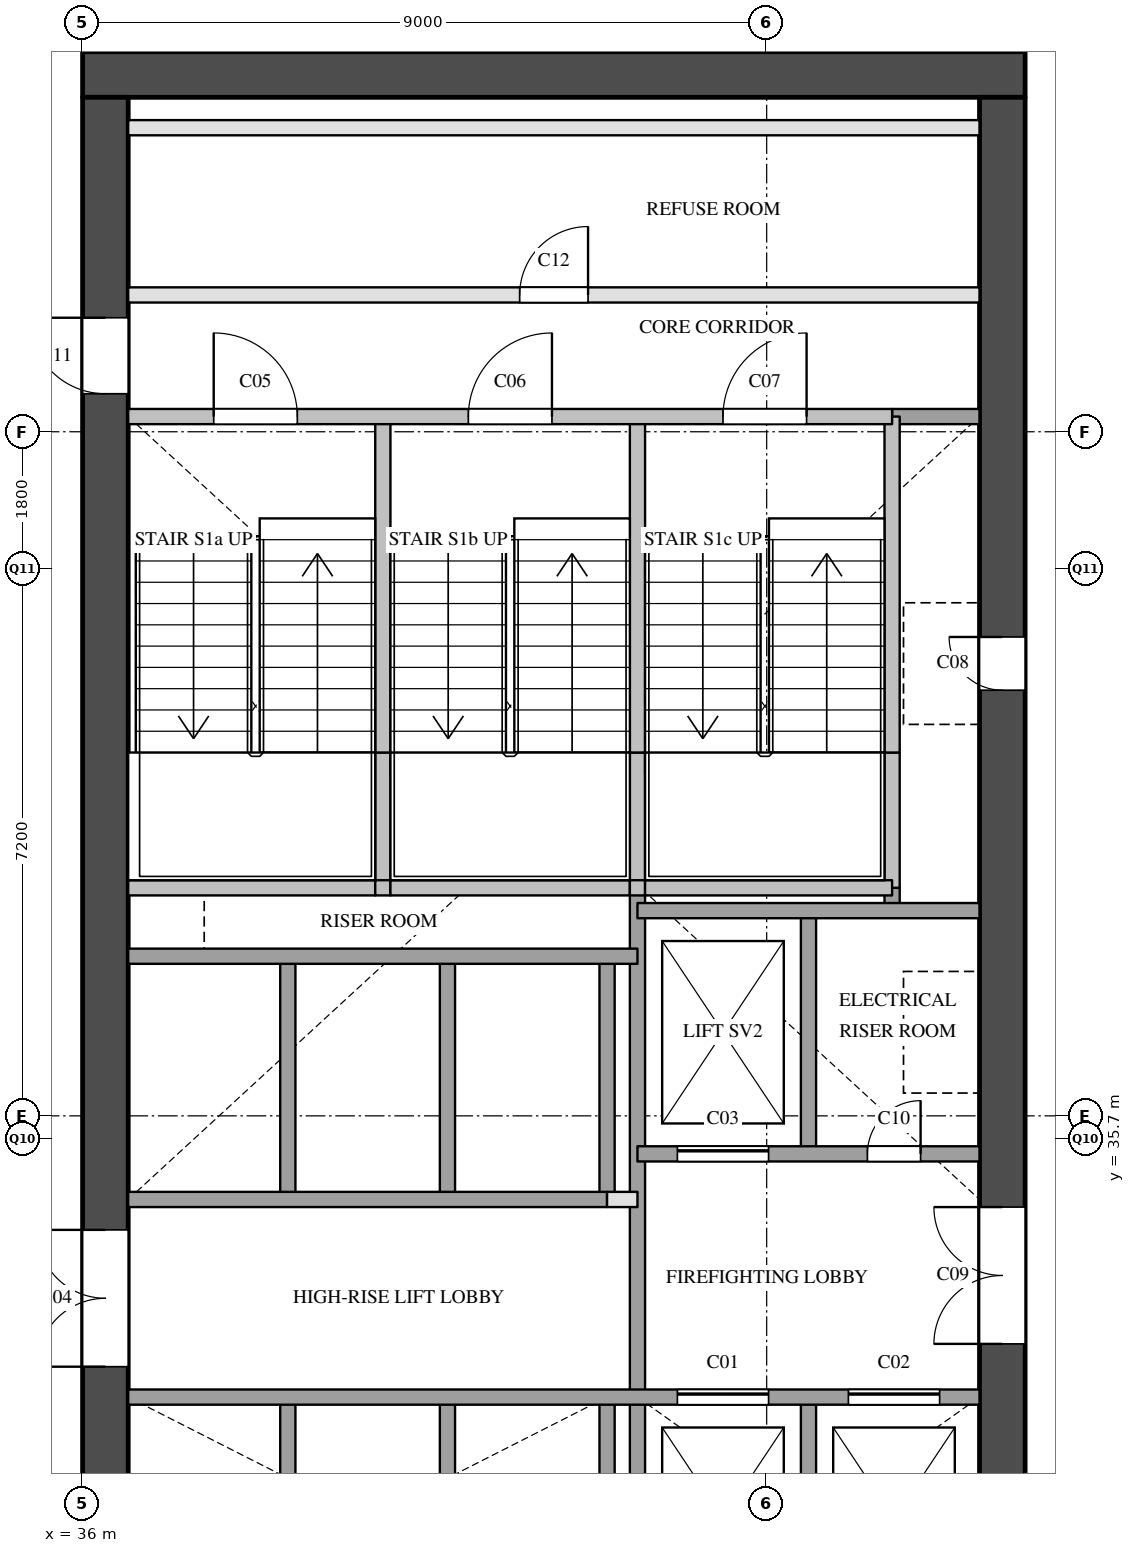
"""IFC4 building model, lengths in metres.
Left out: names, types, materials, properties, quantities, classifications, styles, units other than length and angle.
Written with IfcOpenShell. Run it as: python <this file> out.ifc"""

import sys

from ifc_helpers import new_model, si_unit, direction, frame, frame_2d, origin, place, context, subcontext, project, spatial, rectangle, extrude, element, fill, save


model = new_model("IFC4")
c1 = context("Model", 3, precision=1e-05, world=origin(), true_north=direction((0.0, 1.0)))
c2 = subcontext(c1, "Body", "Model", "MODEL_VIEW")
j1 = project(units=[si_unit("LENGTHUNIT", "METRE"), si_unit("PLANEANGLEUNIT", "RADIAN")], contexts=[c1])
p1 = place(None, origin())
s1 = spatial("IfcSite", under=j1, at=p1, CompositionType="ELEMENT")
p2 = place(p1, origin())
s2 = spatial("IfcBuilding", under=s1, at=p2, CompositionType="ELEMENT")
p3 = place(p2, frame((0.0, 0.0, 96.8)))
s3 = spatial("IfcBuildingStorey", under=s2, at=p3, CompositionType="ELEMENT", Elevation=96.8)
p4 = place(p3, frame((36.0, 49.7, 0.0), z_axis=(0.0, 0.0, 1.0), x_axis=(1.0, 0.0, 0.0)))
e1 = element("IfcWall", 1, at=p4, inside=s3, PredefinedType="SHEAR", context=c2, shape_type="SweptSolid", body=[
    extrude(rectangle(XDim=12.4, YDim=0.6, at=frame_2d((6.2, 0.0))), origin(), (0.0, 0.0, 1.0), 3.5),
])
p5 = place(p3, frame((36.3, 29.1, 0.0), z_axis=(0.0, 0.0, 1.0), x_axis=(0.0, 1.0, 0.0)))
e2 = element("IfcWall", 2, at=p5, inside=s3, PredefinedType="SHEAR", context=c2, shape_type="SweptSolid", body=[
    extrude(rectangle(XDim=20.3, YDim=0.6, at=frame_2d((10.15, 0.0))), origin(), (0.0, 0.0, 1.0), 3.5),
])
p6 = place(p5, frame((3.6, 0.0, 0.0)))
e3 = element("IfcOpeningElement", 3, at=p6, cuts=e2, PredefinedType="OPENING", context=c2, shape_type="SweptSolid", body=[
    extrude(rectangle(XDim=1.8, YDim=2.1, at=frame_2d((0.9, 1.05))), frame((0.0, 0.31, 0.0), z_axis=(0.0, -1.0, 0.0), x_axis=(1.0, 0.0, 0.0)), (0.0, 0.0, 1.0), 0.62),
])
p7 = place(p5, frame((16.4, 0.0, 0.0)))
e4 = element("IfcOpeningElement", 4, at=p7, cuts=e2, PredefinedType="OPENING", context=c2, shape_type="SweptSolid", body=[
    extrude(rectangle(XDim=1.0, YDim=2.1, at=frame_2d((0.5, 1.05))), frame((0.0, 0.31, 0.0), z_axis=(0.0, -1.0, 0.0), x_axis=(1.0, 0.0, 0.0)), (0.0, 0.0, 1.0), 0.62),
])
p8 = place(p3, frame((48.1, 29.1, 0.0), z_axis=(0.0, 0.0, 1.0), x_axis=(0.0, 1.0, 0.0)))
e5 = element("IfcWall", 5, at=p8, inside=s3, PredefinedType="SHEAR", context=c2, shape_type="SweptSolid", body=[
    extrude(rectangle(XDim=20.3, YDim=0.6, at=frame_2d((10.15, 0.0))), origin(), (0.0, 0.0, 1.0), 3.5),
])
p9 = place(p8, frame((12.5, 0.0, 0.0)))
e6 = element("IfcOpeningElement", 6, at=p9, cuts=e5, PredefinedType="OPENING", context=c2, shape_type="SweptSolid", body=[
    extrude(rectangle(XDim=0.7, YDim=2.1, at=frame_2d((0.35, 1.05))), frame((0.0, 0.31, 0.0), z_axis=(0.0, -1.0, 0.0), x_axis=(1.0, 0.0, 0.0)), (0.0, 0.0, 1.0), 0.62),
])
p10 = place(p8, frame((3.9, 0.0, 0.0)))
e7 = element("IfcOpeningElement", 7, at=p10, cuts=e5, PredefinedType="OPENING", context=c2, shape_type="SweptSolid", body=[
    extrude(rectangle(XDim=1.8, YDim=2.1, at=frame_2d((0.9, 1.05))), frame((0.0, 0.31, 0.0), z_axis=(0.0, -1.0, 0.0), x_axis=(1.0, 0.0, 0.0)), (0.0, 0.0, 1.0), 0.62),
])
p11 = place(p3, frame((38.7, 29.1, 0.0), z_axis=(0.0, 0.0, 1.0), x_axis=(0.0, 1.0, 0.0)))
e8 = element("IfcWall", 8, at=p11, inside=s3, PredefinedType="SOLIDWALL", context=c2, shape_type="SweptSolid", body=[
    extrude(rectangle(XDim=3.2, YDim=0.2, at=frame_2d((1.6, 0.0))), origin(), (0.0, 0.0, 1.0), 3.5),
])
p12 = place(p3, frame((38.7, 34.9, 0.0), z_axis=(0.0, 0.0, 1.0), x_axis=(0.0, 1.0, 0.0)))
e9 = element("IfcWall", 9, at=p12, inside=s3, PredefinedType="SOLIDWALL", context=c2, shape_type="SweptSolid", body=[
    extrude(rectangle(XDim=3.2, YDim=0.2, at=frame_2d((1.6, 0.0))), origin(), (0.0, 0.0, 1.0), 3.5),
])
p13 = place(p3, frame((39.95, 39.0, 0.0), z_axis=(0.0, 0.0, 1.0), x_axis=(0.0, 1.0, 0.0)))
e10 = element("IfcWall", 10, at=p13, inside=s3, PredefinedType="SOLIDWALL", context=c2, shape_type="SweptSolid", body=[
    extrude(rectangle(XDim=1.78, YDim=0.2, at=frame_2d((0.89, 0.0))), origin(), (0.0, 0.0, 1.0), 3.5),
])
p14 = place(p3, frame((39.95, 40.78, 0.0), z_axis=(0.0, 0.0, 1.0), x_axis=(0.0, 1.0, 0.0)))
e11 = element("IfcWall", 11, at=p14, inside=s3, PredefinedType="SOLIDWALL", context=c2, shape_type="SweptSolid", body=[
    extrude(rectangle(XDim=4.42, YDim=0.2, at=frame_2d((2.21, 0.0))), origin(), (0.0, 0.0, 1.0), 3.5),
])
p15 = place(p3, frame((40.8, 29.1, 0.0), z_axis=(0.0, 0.0, 1.0), x_axis=(0.0, 1.0, 0.0)))
e12 = element("IfcWall", 12, at=p15, inside=s3, PredefinedType="SOLIDWALL", context=c2, shape_type="SweptSolid", body=[
    extrude(rectangle(XDim=3.2, YDim=0.2, at=frame_2d((1.6, 0.0))), origin(), (0.0, 0.0, 1.0), 3.5),
])
p16 = place(p3, frame((40.8, 34.9, 0.0), z_axis=(0.0, 0.0, 1.0), x_axis=(0.0, 1.0, 0.0)))
e13 = element("IfcWall", 13, at=p16, inside=s3, PredefinedType="SOLIDWALL", context=c2, shape_type="SweptSolid", body=[
    extrude(rectangle(XDim=3.2, YDim=0.2, at=frame_2d((1.6, 0.0))), origin(), (0.0, 0.0, 1.0), 3.5),
])
p17 = place(p3, frame((42.9, 29.1, 0.0), z_axis=(0.0, 0.0, 1.0), x_axis=(0.0, 1.0, 0.0)))
e14 = element("IfcWall", 14, at=p17, inside=s3, PredefinedType="SOLIDWALL", context=c2, shape_type="SweptSolid", body=[
    extrude(rectangle(XDim=3.2, YDim=0.2, at=frame_2d((1.6, 0.0))), origin(), (0.0, 0.0, 1.0), 3.5),
])
p18 = place(p3, frame((42.9, 34.9, 0.0), z_axis=(0.0, 0.0, 1.0), x_axis=(0.0, 1.0, 0.0)))
e15 = element("IfcWall", 15, at=p18, inside=s3, PredefinedType="SOLIDWALL", context=c2, shape_type="SweptSolid", body=[
    extrude(rectangle(XDim=3.2, YDim=0.2, at=frame_2d((1.6, 0.0))), origin(), (0.0, 0.0, 1.0), 3.5),
])
p19 = place(p3, frame((43.3, 29.1, 0.0), z_axis=(0.0, 0.0, 1.0), x_axis=(0.0, 1.0, 0.0)))
e16 = element("IfcWall", 16, at=p19, inside=s3, PredefinedType="SOLIDWALL", context=c2, shape_type="SweptSolid", body=[
    extrude(rectangle(XDim=9.9, YDim=0.2, at=frame_2d((4.95, 0.0))), origin(), (0.0, 0.0, 1.0), 3.5),
])
p20 = place(p3, frame((43.3, 39.0, 0.0), z_axis=(0.0, 0.0, 1.0), x_axis=(0.0, 1.0, 0.0)))
e17 = element("IfcWall", 17, at=p20, inside=s3, PredefinedType="SOLIDWALL", context=c2, shape_type="SweptSolid", body=[
    extrude(rectangle(XDim=1.78, YDim=0.2, at=frame_2d((0.89, 0.0))), origin(), (0.0, 0.0, 1.0), 3.5),
])
p21 = place(p3, frame((43.3, 40.78, 0.0), z_axis=(0.0, 0.0, 1.0), x_axis=(0.0, 1.0, 0.0)))
e18 = element("IfcWall", 18, at=p21, inside=s3, PredefinedType="SOLIDWALL", context=c2, shape_type="SweptSolid", body=[
    extrude(rectangle(XDim=4.42, YDim=0.2, at=frame_2d((2.21, 0.0))), origin(), (0.0, 0.0, 1.0), 3.5),
])
for number, where, z_axis, x_axis in (
    (19, (45.55, 29.1, 0.0), (0.0, 0.0, 1.0), (0.0, 1.0, 0.0)),
    (20, (45.55, 35.5, 0.0), (0.0, 0.0, 1.0), (0.0, 1.0, 0.0)),
):
    element("IfcWall", number, at=place(p3, frame(where, z_axis=z_axis, x_axis=x_axis)), inside=s3, PredefinedType="SOLIDWALL", context=c2, shape_type="SweptSolid", body=[
        extrude(rectangle(XDim=3.2, YDim=0.2, at=frame_2d((1.6, 0.0))), origin(), (0.0, 0.0, 1.0), 3.5),
    ])
p22 = place(p3, frame((46.65, 38.7, 0.0), z_axis=(0.0, 0.0, 1.0), x_axis=(0.0, 1.0, 0.0)))
e21 = element("IfcWall", 21, at=p22, inside=s3, PredefinedType="SOLIDWALL", context=c2, shape_type="SweptSolid", body=[
    extrude(rectangle(XDim=0.3, YDim=0.2, at=frame_2d((0.15, 0.0))), origin(), (0.0, 0.0, 1.0), 3.5),
])
p23 = place(p3, frame((46.65, 39.0, 0.0), z_axis=(0.0, 0.0, 1.0), x_axis=(0.0, 1.0, 0.0)))
e22 = element("IfcWall", 22, at=p23, inside=s3, PredefinedType="SOLIDWALL", context=c2, shape_type="SweptSolid", body=[
    extrude(rectangle(XDim=1.78, YDim=0.2, at=frame_2d((0.89, 0.0))), origin(), (0.0, 0.0, 1.0), 3.5),
])
p24 = place(p3, frame((46.65, 40.78, 0.0), z_axis=(0.0, 0.0, 1.0), x_axis=(0.0, 1.0, 0.0)))
e23 = element("IfcWall", 23, at=p24, inside=s3, PredefinedType="SOLIDWALL", context=c2, shape_type="SweptSolid", body=[
    extrude(rectangle(XDim=4.42, YDim=0.2, at=frame_2d((2.21, 0.0))), origin(), (0.0, 0.0, 1.0), 3.5),
])
p25 = place(p3, frame((36.6, 32.3, 0.0), z_axis=(0.0, 0.0, 1.0), x_axis=(1.0, 0.0, 0.0)))
e24 = element("IfcWall", 24, at=p25, inside=s3, PredefinedType="SOLIDWALL", context=c2, shape_type="SweptSolid", body=[
    extrude(rectangle(XDim=11.2, YDim=0.2, at=frame_2d((5.6, 0.0))), origin(), (0.0, 0.0, 1.0), 3.5),
])
p26 = place(p25, frame((7.225, 0.0, 0.0)))
e25 = element("IfcOpeningElement", 25, at=p26, cuts=e24, PredefinedType="OPENING", context=c2, shape_type="SweptSolid", body=[
    extrude(rectangle(XDim=1.2, YDim=2.1, at=frame_2d((0.6, 1.05))), frame((0.0, 0.11, 0.0), z_axis=(0.0, -1.0, 0.0), x_axis=(1.0, 0.0, 0.0)), (0.0, 0.0, 1.0), 0.22),
])
p27 = place(p25, frame((9.475, 0.0, 0.0)))
e26 = element("IfcOpeningElement", 26, at=p27, cuts=e24, PredefinedType="OPENING", context=c2, shape_type="SweptSolid", body=[
    extrude(rectangle(XDim=1.2, YDim=2.1, at=frame_2d((0.6, 1.05))), frame((0.0, 0.11, 0.0), z_axis=(0.0, -1.0, 0.0), x_axis=(1.0, 0.0, 0.0)), (0.0, 0.0, 1.0), 0.22),
])
p28 = place(p3, frame((42.9, 34.9, 0.0), z_axis=(0.0, 0.0, 1.0), x_axis=(1.0, 0.0, 0.0)))
e27 = element("IfcWall", 27, at=p28, inside=s3, PredefinedType="PARTITIONING", context=c2, shape_type="SweptSolid", body=[
    extrude(rectangle(XDim=0.4, YDim=0.2, at=frame_2d((0.2, 0.0))), origin(), (0.0, 0.0, 1.0), 3.5),
])
p29 = place(p3, frame((36.6, 34.9, 0.0), z_axis=(0.0, 0.0, 1.0), x_axis=(1.0, 0.0, 0.0)))
e28 = element("IfcWall", 28, at=p29, inside=s3, PredefinedType="SOLIDWALL", context=c2, shape_type="SweptSolid", body=[
    extrude(rectangle(XDim=6.3, YDim=0.2, at=frame_2d((3.15, 0.0))), origin(), (0.0, 0.0, 1.0), 3.5),
])
p30 = place(p3, frame((43.3, 35.5, 0.0), z_axis=(0.0, 0.0, 1.0), x_axis=(1.0, 0.0, 0.0)))
e29 = element("IfcWall", 29, at=p30, inside=s3, PredefinedType="SOLIDWALL", context=c2, shape_type="SweptSolid", body=[
    extrude(rectangle(XDim=4.5, YDim=0.2, at=frame_2d((2.25, 0.0))), origin(), (0.0, 0.0, 1.0), 3.5),
])
p31 = place(p30, frame((0.525, 0.0, 0.0)))
e30 = element("IfcOpeningElement", 30, at=p31, cuts=e29, PredefinedType="OPENING", context=c2, shape_type="SweptSolid", body=[
    extrude(rectangle(XDim=1.2, YDim=2.1, at=frame_2d((0.6, 1.05))), frame((0.0, 0.11, 0.0), z_axis=(0.0, -1.0, 0.0), x_axis=(1.0, 0.0, 0.0)), (0.0, 0.0, 1.0), 0.22),
])
p32 = place(p30, frame((3.025, 0.0, 0.0)))
e31 = element("IfcOpeningElement", 31, at=p32, cuts=e29, PredefinedType="OPENING", context=c2, shape_type="SweptSolid", body=[
    extrude(rectangle(XDim=0.7, YDim=2.1, at=frame_2d((0.35, 1.05))), frame((0.0, 0.11, 0.0), z_axis=(0.0, -1.0, 0.0), x_axis=(1.0, 0.0, 0.0)), (0.0, 0.0, 1.0), 0.22),
])
p33 = place(p3, frame((36.6, 38.1, 0.0), z_axis=(0.0, 0.0, 1.0), x_axis=(1.0, 0.0, 0.0)))
e32 = element("IfcWall", 32, at=p33, inside=s3, PredefinedType="SOLIDWALL", context=c2, shape_type="SweptSolid", body=[
    extrude(rectangle(XDim=6.7, YDim=0.2, at=frame_2d((3.35, 0.0))), origin(), (0.0, 0.0, 1.0), 3.5),
])
p34 = place(p3, frame((43.3, 38.7, 0.0), z_axis=(0.0, 0.0, 1.0), x_axis=(1.0, 0.0, 0.0)))
e33 = element("IfcWall", 33, at=p34, inside=s3, PredefinedType="SOLIDWALL", context=c2, shape_type="SweptSolid", body=[
    extrude(rectangle(XDim=4.5, YDim=0.2, at=frame_2d((2.25, 0.0))), origin(), (0.0, 0.0, 1.0), 3.5),
])
p35 = place(p3, frame((36.6, 39.0, 0.0), z_axis=(0.0, 0.0, 1.0), x_axis=(1.0, 0.0, 0.0)))
e34 = element("IfcWall", 34, at=p35, inside=s3, PredefinedType="SOLIDWALL", context=c2, shape_type="SweptSolid", body=[
    extrude(rectangle(XDim=3.25, YDim=0.2, at=frame_2d((1.625, 0.0))), origin(), (0.0, 0.0, 1.0), 3.5),
])
p36 = place(p3, frame((39.85, 39.0, 0.0), z_axis=(0.0, 0.0, 1.0), x_axis=(1.0, 0.0, 0.0)))
e35 = element("IfcWall", 35, at=p36, inside=s3, PredefinedType="SOLIDWALL", context=c2, shape_type="SweptSolid", body=[
    extrude(rectangle(XDim=0.2, YDim=0.2, at=frame_2d((0.1, 0.0))), origin(), (0.0, 0.0, 1.0), 3.5),
])
p37 = place(p3, frame((40.05, 39.0, 0.0), z_axis=(0.0, 0.0, 1.0), x_axis=(1.0, 0.0, 0.0)))
e36 = element("IfcWall", 36, at=p37, inside=s3, PredefinedType="SOLIDWALL", context=c2, shape_type="SweptSolid", body=[
    extrude(rectangle(XDim=3.15, YDim=0.2, at=frame_2d((1.575, 0.0))), origin(), (0.0, 0.0, 1.0), 3.5),
])
p38 = place(p3, frame((43.2, 39.0, 0.0), z_axis=(0.0, 0.0, 1.0), x_axis=(1.0, 0.0, 0.0)))
e37 = element("IfcWall", 37, at=p38, inside=s3, PredefinedType="SOLIDWALL", context=c2, shape_type="SweptSolid", body=[
    extrude(rectangle(XDim=0.2, YDim=0.2, at=frame_2d((0.1, 0.0))), origin(), (0.0, 0.0, 1.0), 3.5),
])
p39 = place(p3, frame((43.4, 39.0, 0.0), z_axis=(0.0, 0.0, 1.0), x_axis=(1.0, 0.0, 0.0)))
e38 = element("IfcWall", 38, at=p39, inside=s3, PredefinedType="SOLIDWALL", context=c2, shape_type="SweptSolid", body=[
    extrude(rectangle(XDim=3.25, YDim=0.2, at=frame_2d((1.625, 0.0))), origin(), (0.0, 0.0, 1.0), 3.5),
])
p40 = place(p3, frame((46.65, 45.2, 0.0), z_axis=(0.0, 0.0, 1.0), x_axis=(1.0, 0.0, 0.0)))
e39 = element("IfcWall", 39, at=p40, inside=s3, PredefinedType="SOLIDWALL", context=c2, shape_type="SweptSolid", body=[
    extrude(rectangle(XDim=1.15, YDim=0.2, at=frame_2d((0.575, 0.0))), origin(), (0.0, 0.0, 1.0), 3.5),
])
p41 = place(p3, frame((36.6, 45.2, 0.0), z_axis=(0.0, 0.0, 1.0), x_axis=(1.0, 0.0, 0.0)))
e40 = element("IfcWall", 40, at=p41, inside=s3, PredefinedType="SOLIDWALL", context=c2, shape_type="SweptSolid", body=[
    extrude(rectangle(XDim=10.05, YDim=0.2, at=frame_2d((5.025, 0.0))), origin(), (0.0, 0.0, 1.0), 3.5),
])
p42 = place(p41, frame((1.125, 0.0, 0.0)))
e41 = element("IfcOpeningElement", 41, at=p42, cuts=e40, PredefinedType="OPENING", context=c2, shape_type="SweptSolid", body=[
    extrude(rectangle(XDim=1.1, YDim=2.1, at=frame_2d((0.55, 1.05))), frame((0.0, 0.11, 0.0), z_axis=(0.0, -1.0, 0.0), x_axis=(1.0, 0.0, 0.0)), (0.0, 0.0, 1.0), 0.22),
])
p43 = place(p41, frame((4.475, 0.0, 0.0)))
e42 = element("IfcOpeningElement", 42, at=p43, cuts=e40, PredefinedType="OPENING", context=c2, shape_type="SweptSolid", body=[
    extrude(rectangle(XDim=1.1, YDim=2.1, at=frame_2d((0.55, 1.05))), frame((0.0, 0.11, 0.0), z_axis=(0.0, -1.0, 0.0), x_axis=(1.0, 0.0, 0.0)), (0.0, 0.0, 1.0), 0.22),
])
p44 = place(p41, frame((7.825, 0.0, 0.0)))
e43 = element("IfcOpeningElement", 43, at=p44, cuts=e40, PredefinedType="OPENING", context=c2, shape_type="SweptSolid", body=[
    extrude(rectangle(XDim=1.1, YDim=2.1, at=frame_2d((0.55, 1.05))), frame((0.0, 0.11, 0.0), z_axis=(0.0, -1.0, 0.0), x_axis=(1.0, 0.0, 0.0)), (0.0, 0.0, 1.0), 0.22),
])
p45 = place(p3, frame((36.6, 46.8, 0.0), z_axis=(0.0, 0.0, 1.0), x_axis=(1.0, 0.0, 0.0)))
e44 = element("IfcWall", 44, at=p45, inside=s3, PredefinedType="PARTITIONING", context=c2, shape_type="SweptSolid", body=[
    extrude(rectangle(XDim=11.2, YDim=0.2, at=frame_2d((5.6, 0.0))), origin(), (0.0, 0.0, 1.0), 3.5),
])
p46 = place(p45, frame((5.15, 0.0, 0.0)))
e45 = element("IfcOpeningElement", 45, at=p46, cuts=e44, PredefinedType="OPENING", context=c2, shape_type="SweptSolid", body=[
    extrude(rectangle(XDim=0.9, YDim=2.1, at=frame_2d((0.45, 1.05))), frame((0.0, 0.11, 0.0), z_axis=(0.0, -1.0, 0.0), x_axis=(1.0, 0.0, 0.0)), (0.0, 0.0, 1.0), 0.22),
])
p47 = place(p3, frame((36.6, 49.0, 0.0), z_axis=(0.0, 0.0, 1.0), x_axis=(1.0, 0.0, 0.0)))
e46 = element("IfcWall", 46, at=p47, inside=s3, PredefinedType="PARTITIONING", context=c2, shape_type="SweptSolid", body=[
    extrude(rectangle(XDim=11.2, YDim=0.2, at=frame_2d((5.6, 0.0))), origin(), (0.0, 0.0, 1.0), 3.5),
])
p48 = place(p26, origin())
e47 = element("IfcDoor", 47, at=p48, inside=s3, OperationType="SLIDING_TO_LEFT", PredefinedType="DOOR", context=c2, shape_type="SweptSolid", body=[
    extrude(rectangle(XDim=1.2, YDim=2.1, at=frame_2d((0.6, 1.05))), frame((0.0, 0.025, 0.0), z_axis=(0.0, -1.0, 0.0), x_axis=(1.0, 0.0, 0.0)), (0.0, 0.0, 1.0), 0.05),
])
fill(e25, e47)
p49 = place(p27, origin())
e48 = element("IfcDoor", 48, at=p49, inside=s3, OperationType="SLIDING_TO_LEFT", PredefinedType="DOOR", context=c2, shape_type="SweptSolid", body=[
    extrude(rectangle(XDim=1.2, YDim=2.1, at=frame_2d((0.6, 1.05))), frame((0.0, 0.025, 0.0), z_axis=(0.0, -1.0, 0.0), x_axis=(1.0, 0.0, 0.0)), (0.0, 0.0, 1.0), 0.05),
])
fill(e26, e48)
p50 = place(p31, origin())
e49 = element("IfcDoor", 49, at=p50, inside=s3, OperationType="SLIDING_TO_LEFT", PredefinedType="DOOR", context=c2, shape_type="SweptSolid", body=[
    extrude(rectangle(XDim=1.2, YDim=2.1, at=frame_2d((0.6, 1.05))), frame((0.0, 0.025, 0.0), z_axis=(0.0, -1.0, 0.0), x_axis=(1.0, 0.0, 0.0)), (0.0, 0.0, 1.0), 0.05),
])
fill(e30, e49)
p51 = place(p6, origin())
e50 = element("IfcDoor", 50, at=p51, inside=s3, OperationType="DOUBLE_DOOR_SINGLE_SWING", PredefinedType="DOOR", context=c2, shape_type="SweptSolid", body=[
    extrude(rectangle(XDim=1.8, YDim=2.1, at=frame_2d((0.9, 1.05))), frame((0.0, 0.025, 0.0), z_axis=(0.0, -1.0, 0.0), x_axis=(1.0, 0.0, 0.0)), (0.0, 0.0, 1.0), 0.05),
])
fill(e3, e50)
p52 = place(p42, origin())
e51 = element("IfcDoor", 51, at=p52, inside=s3, OperationType="SINGLE_SWING_LEFT", PredefinedType="DOOR", context=c2, shape_type="SweptSolid", body=[
    extrude(rectangle(XDim=1.1, YDim=2.1, at=frame_2d((0.55, 1.05))), frame((0.0, 0.025, 0.0), z_axis=(0.0, -1.0, 0.0), x_axis=(1.0, 0.0, 0.0)), (0.0, 0.0, 1.0), 0.05),
])
fill(e41, e51)
p53 = place(p43, origin())
e52 = element("IfcDoor", 52, at=p53, inside=s3, OperationType="SINGLE_SWING_RIGHT", PredefinedType="DOOR", context=c2, shape_type="SweptSolid", body=[
    extrude(rectangle(XDim=1.1, YDim=2.1, at=frame_2d((0.55, 1.05))), frame((0.0, 0.025, 0.0), z_axis=(0.0, -1.0, 0.0), x_axis=(1.0, 0.0, 0.0)), (0.0, 0.0, 1.0), 0.05),
])
fill(e42, e52)
p54 = place(p44, origin())
e53 = element("IfcDoor", 53, at=p54, inside=s3, OperationType="SINGLE_SWING_RIGHT", PredefinedType="DOOR", context=c2, shape_type="SweptSolid", body=[
    extrude(rectangle(XDim=1.1, YDim=2.1, at=frame_2d((0.55, 1.05))), frame((0.0, 0.025, 0.0), z_axis=(0.0, -1.0, 0.0), x_axis=(1.0, 0.0, 0.0)), (0.0, 0.0, 1.0), 0.05),
])
fill(e43, e53)
p55 = place(p9, origin())
e54 = element("IfcDoor", 54, at=p55, inside=s3, OperationType="SINGLE_SWING_RIGHT", PredefinedType="DOOR", context=c2, shape_type="SweptSolid", body=[
    extrude(rectangle(XDim=0.7, YDim=2.1, at=frame_2d((0.35, 1.05))), frame((0.0, 0.025, 0.0), z_axis=(0.0, -1.0, 0.0), x_axis=(1.0, 0.0, 0.0)), (0.0, 0.0, 1.0), 0.05),
])
fill(e6, e54)
p56 = place(p10, origin())
e55 = element("IfcDoor", 55, at=p56, inside=s3, OperationType="DOUBLE_DOOR_SINGLE_SWING", PredefinedType="DOOR", context=c2, shape_type="SweptSolid", body=[
    extrude(rectangle(XDim=1.8, YDim=2.1, at=frame_2d((0.9, 1.05))), frame((0.0, 0.025, 0.0), z_axis=(0.0, -1.0, 0.0), x_axis=(1.0, 0.0, 0.0)), (0.0, 0.0, 1.0), 0.05),
])
fill(e7, e55)
p57 = place(p32, origin())
e56 = element("IfcDoor", 56, at=p57, inside=s3, OperationType="SINGLE_SWING_RIGHT", PredefinedType="DOOR", context=c2, shape_type="SweptSolid", body=[
    extrude(rectangle(XDim=0.7, YDim=2.1, at=frame_2d((0.35, 1.05))), frame((0.0, 0.025, 0.0), z_axis=(0.0, -1.0, 0.0), x_axis=(1.0, 0.0, 0.0)), (0.0, 0.0, 1.0), 0.05),
])
fill(e31, e56)
p58 = place(p7, origin())
e57 = element("IfcDoor", 57, at=p58, inside=s3, OperationType="SINGLE_SWING_RIGHT", PredefinedType="DOOR", context=c2, shape_type="SweptSolid", body=[
    extrude(rectangle(XDim=1.0, YDim=2.1, at=frame_2d((0.5, 1.05))), frame((0.0, 0.025, 0.0), z_axis=(0.0, -1.0, 0.0), x_axis=(1.0, 0.0, 0.0)), (0.0, 0.0, 1.0), 0.05),
])
fill(e4, e57)
p59 = place(p46, origin())
e58 = element("IfcDoor", 58, at=p59, inside=s3, OperationType="SINGLE_SWING_RIGHT", PredefinedType="DOOR", context=c2, shape_type="SweptSolid", body=[
    extrude(rectangle(XDim=0.9, YDim=2.1, at=frame_2d((0.45, 1.05))), frame((0.0, 0.025, 0.0), z_axis=(0.0, -1.0, 0.0), x_axis=(1.0, 0.0, 0.0)), (0.0, 0.0, 1.0), 0.05),
])
fill(e45, e58)
save(model, sys.argv[1])
